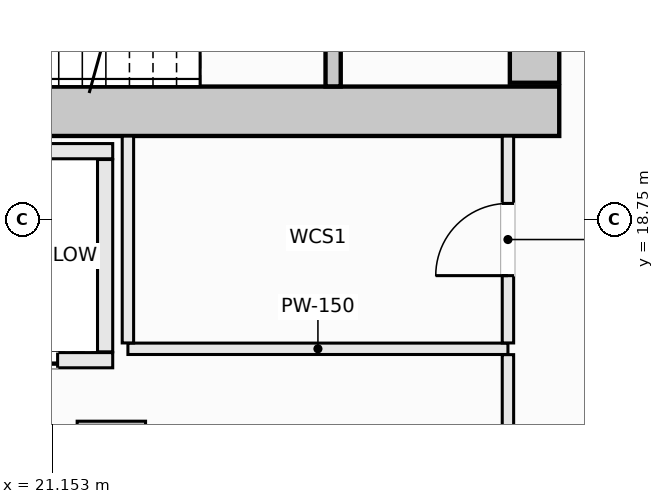
"""IFC4 building model, lengths in metres.
Left out: names, types, materials, properties, quantities, classifications, styles, units other than length and angle.
Written with IfcOpenShell. Run it as: python <this file> out.ifc"""

import sys

from ifc_helpers import new_model, si_unit, direction, frame, frame_2d, origin, origin_2d, place, context, subcontext, project, spatial, rectangle, extrude, element, fill, save


model = new_model("IFC4")
c1 = context("Model", 3, precision=1e-05, world=origin(), true_north=direction((0.0, 1.0)))
c2 = subcontext(c1, "Body", "Model", "MODEL_VIEW")
j1 = project(units=[si_unit("LENGTHUNIT", "METRE"), si_unit("PLANEANGLEUNIT", "RADIAN")], contexts=[c1])
p1 = place(None, origin())
s1 = spatial("IfcSite", under=j1, at=p1, CompositionType="ELEMENT")
p2 = place(p1, origin())
s2 = spatial("IfcBuilding", under=s1, at=p2, CompositionType="ELEMENT")
p3 = place(p2, frame((0.0, 0.0, 115.5)))
s3 = spatial("IfcBuildingStorey", under=s2, at=p3, CompositionType="ELEMENT", Elevation=115.5)
p4 = place(p3, frame((14.175, 20.175, -0.27), z_axis=(0.0, 0.0, 1.0), x_axis=(1.0, 0.0, 0.0)))
e1 = element("IfcWall", 1, at=p4, inside=s3, PredefinedType="SHEAR", context=c2, shape_type="SweptSolid", body=[
    extrude(rectangle(XDim=13.65, YDim=0.65, at=frame_2d((6.825, 0.0))), origin(), (0.0, 0.0, 1.0), 3.4),
])
p5 = place(p3, frame((27.5, 20.55, -0.27), z_axis=(0.0, 0.0, 1.0), x_axis=(0.0, 1.0, 0.0)))
e2 = element("IfcWall", 2, at=p5, inside=s3, PredefinedType="SHEAR", context=c2, shape_type="SweptSolid", body=[
    extrude(rectangle(XDim=1.5, YDim=0.65, at=frame_2d((0.75, 0.0))), origin(), (0.0, 0.0, 1.0), 3.4),
])
p6 = place(p3, frame((21.932, 15.648, -0.27), z_axis=(0.0, 0.0, 1.0), x_axis=(1.0, 0.0, 0.0)))
e3 = element("IfcColumn", 3, at=p6, inside=s3, PredefinedType="COLUMN", context=c2, shape_type="SweptSolid", body=[
    extrude(rectangle(XDim=0.9, YDim=0.9, at=origin_2d()), origin(), (0.0, 0.0, 1.0), 3.4),
])
p7 = place(p3, frame((24.85, 20.502, -0.27), z_axis=(0.0, 0.0, 1.0), x_axis=(0.0, 1.0, 0.0)))
e4 = element("IfcWall", 4, at=p7, inside=s3, PredefinedType="SHEAR", context=c2, shape_type="SweptSolid", body=[
    extrude(rectangle(XDim=3.038, YDim=0.2, at=frame_2d((1.519, 0.0))), origin(), (0.0, 0.0, 1.0), 3.4),
])
p8 = place(p7, frame((0.969, 0.0, 0.27)))
e5 = element("IfcOpeningElement", 5, at=p8, cuts=e4, PredefinedType="OPENING", context=c2, shape_type="SweptSolid", body=[
    extrude(rectangle(XDim=1.1, YDim=2.15, at=frame_2d((0.55, 1.075))), frame((0.0, 0.11, 0.0), z_axis=(0.0, -1.0, 0.0), x_axis=(1.0, 0.0, 0.0)), (0.0, 0.0, 1.0), 0.22),
])
p9 = place(p3, frame((19.4, 19.65, 0.0), z_axis=(0.0, 0.0, 1.0), x_axis=(1.0, 0.0, 0.0)))
e6 = element("IfcWall", 6, at=p9, inside=s3, PredefinedType="SOLIDWALL", context=c2, shape_type="SweptSolid", body=[
    extrude(rectangle(XDim=2.55, YDim=0.2, at=frame_2d((1.275, 0.0))), origin(), (0.0, 0.0, 1.0), 3.13),
])
p10 = place(p3, frame((19.4, 16.9, 0.0), z_axis=(0.0, 0.0, 1.0), x_axis=(1.0, 0.0, 0.0)))
e7 = element("IfcWall", 7, at=p10, inside=s3, PredefinedType="SOLIDWALL", context=c2, shape_type="SweptSolid", body=[
    extrude(rectangle(XDim=2.55, YDim=0.2, at=frame_2d((1.275, 0.0))), origin(), (0.0, 0.0, 1.0), 3.13),
])
p11 = place(p10, frame((0.725, 0.0, 0.0)))
e8 = element("IfcOpeningElement", 8, at=p11, cuts=e7, PredefinedType="OPENING", context=c2, shape_type="SweptSolid", body=[
    extrude(rectangle(XDim=1.1, YDim=2.2, at=frame_2d((0.55, 1.1))), frame((0.0, 0.11, 0.0), z_axis=(0.0, -1.0, 0.0), x_axis=(1.0, 0.0, 0.0)), (0.0, 0.0, 1.0), 0.22),
])
p12 = place(p3, frame((21.85, 17.01, 0.0), z_axis=(0.0, 0.0, 1.0), x_axis=(0.0, 1.0, 0.0)))
e9 = element("IfcWall", 9, at=p12, inside=s3, PredefinedType="SOLIDWALL", context=c2, shape_type="SweptSolid", body=[
    extrude(rectangle(XDim=2.53, YDim=0.2, at=frame_2d((1.265, 0.0))), origin(), (0.0, 0.0, 1.0), 3.13),
])
p13 = place(p3, frame((22.15, 17.05, 0.0), z_axis=(0.0, 0.0, 1.0), x_axis=(1.0, 0.0, 0.0)))
e10 = element("IfcWall", 10, at=p13, inside=s3, PredefinedType="PARTITIONING", context=c2, shape_type="SweptSolid", body=[
    extrude(rectangle(XDim=5.0, YDim=0.15, at=frame_2d((2.5, 0.0))), origin(), (0.0, 0.0, 1.0), 3.13),
])
p14 = place(p3, frame((22.15, 17.127, 0.0), z_axis=(0.0, 0.0, 1.0), x_axis=(0.0, 1.0, 0.0)))
e11 = element("IfcWall", 11, at=p14, inside=s3, PredefinedType="PARTITIONING", context=c2, shape_type="SweptSolid", body=[
    extrude(rectangle(XDim=2.721, YDim=0.15, at=frame_2d((1.36, 0.0))), origin(), (0.0, 0.0, 1.0), 3.13),
])
p15 = place(p3, frame((27.15, 11.75, 0.0), z_axis=(0.0, 0.0, 1.0), x_axis=(0.0, 1.0, 0.0)))
e12 = element("IfcWall", 12, at=p15, inside=s3, PredefinedType="PARTITIONING", context=c2, shape_type="SweptSolid", body=[
    extrude(rectangle(XDim=5.223, YDim=0.15, at=frame_2d((2.611, 0.0))), origin(), (0.0, 0.0, 1.0), 3.13),
])
p16 = place(p15, frame((2.969, 0.0, 0.0)))
e13 = element("IfcOpeningElement", 13, at=p16, cuts=e12, PredefinedType="OPENING", context=c2, shape_type="SweptSolid", body=[
    extrude(rectangle(XDim=0.95, YDim=2.1, at=frame_2d((0.475, 1.05))), frame((0.0, 0.085, 0.0), z_axis=(0.0, -1.0, 0.0), x_axis=(1.0, 0.0, 0.0)), (0.0, 0.0, 1.0), 0.17),
])
p17 = place(p3, frame((27.15, 17.127, 0.0), z_axis=(0.0, 0.0, 1.0), x_axis=(0.0, 1.0, 0.0)))
e14 = element("IfcWall", 14, at=p17, inside=s3, PredefinedType="PARTITIONING", context=c2, shape_type="SweptSolid", body=[
    extrude(rectangle(XDim=2.721, YDim=0.15, at=frame_2d((1.36, 0.0))), origin(), (0.0, 0.0, 1.0), 3.13),
])
p18 = place(p17, frame((0.885, 0.0, 0.0)))
e15 = element("IfcOpeningElement", 15, at=p18, cuts=e14, PredefinedType="OPENING", context=c2, shape_type="SweptSolid", body=[
    extrude(rectangle(XDim=0.95, YDim=2.1, at=frame_2d((0.475, 1.05))), frame((0.0, 0.085, 0.0), z_axis=(0.0, -1.0, 0.0), x_axis=(1.0, 0.0, 0.0)), (0.0, 0.0, 1.0), 0.17),
])
p19 = place(p11, origin())
e16 = element("IfcDoor", 16, at=p19, inside=s3, OperationType="SLIDING_TO_LEFT", PredefinedType="DOOR", context=c2, shape_type="SweptSolid", body=[
    extrude(rectangle(XDim=1.1, YDim=2.2, at=frame_2d((0.55, 1.1))), frame((0.0, 0.025, 0.0), z_axis=(0.0, -1.0, 0.0), x_axis=(1.0, 0.0, 0.0)), (0.0, 0.0, 1.0), 0.05),
])
fill(e8, e16)
p20 = place(p18, origin())
e17 = element("IfcDoor", 17, at=p20, inside=s3, OperationType="SINGLE_SWING_LEFT", PredefinedType="DOOR", context=c2, shape_type="SweptSolid", body=[
    extrude(rectangle(XDim=0.95, YDim=2.1, at=frame_2d((0.475, 1.05))), frame((0.0, 0.025, 0.0), z_axis=(0.0, -1.0, 0.0), x_axis=(1.0, 0.0, 0.0)), (0.0, 0.0, 1.0), 0.05),
])
fill(e15, e17)
save(model, sys.argv[1])
